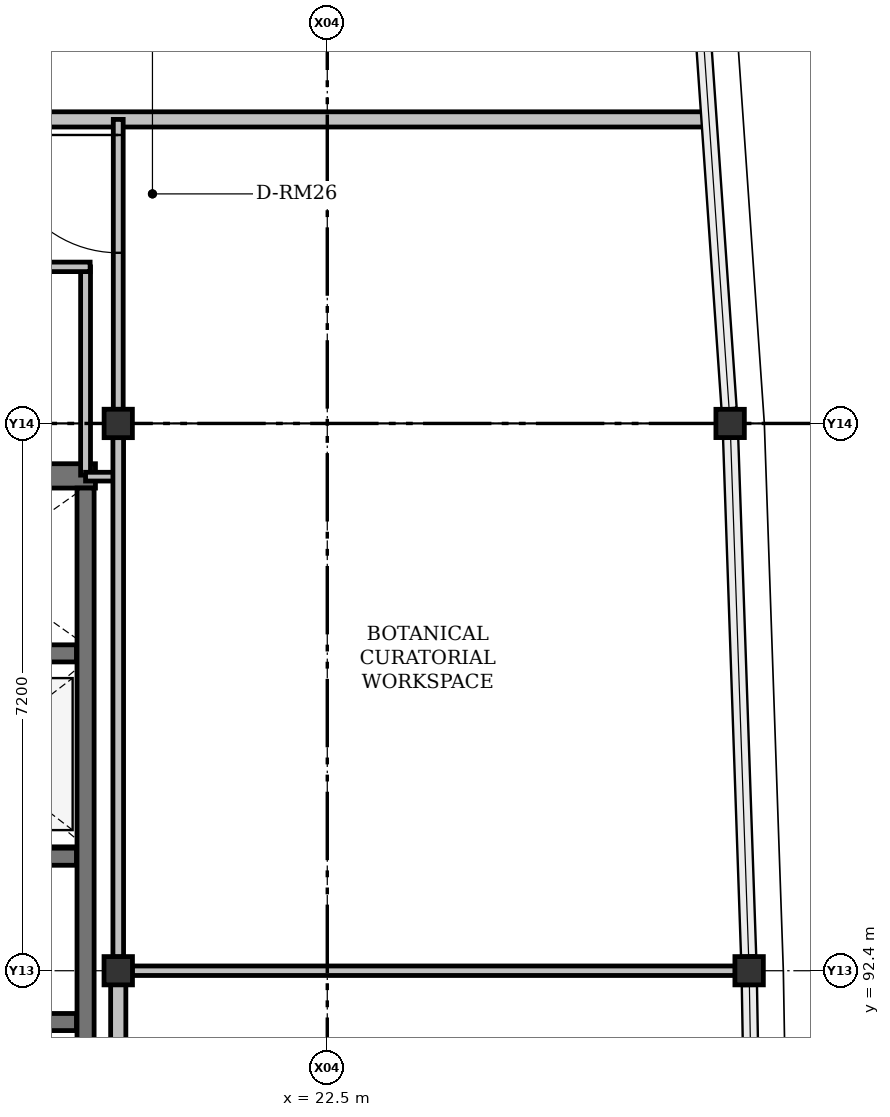
"""IFC4 building model, lengths in metres.
Left out: names, types, materials, properties, quantities, classifications, styles, units other than length and angle.
Written with IfcOpenShell. Run it as: python <this file> out.ifc"""

import sys

from ifc_helpers import new_model, si_unit, direction, frame, frame_2d, origin, origin_2d, place, context, subcontext, project, spatial, rectangle, i_section, extrude, element, fill, save


model = new_model("IFC4")
c1 = context("Model", 3, precision=1e-05, world=origin(), true_north=direction((0.0, 1.0)))
c2 = subcontext(c1, "Body", "Model", "MODEL_VIEW")
j1 = project(units=[si_unit("LENGTHUNIT", "METRE"), si_unit("PLANEANGLEUNIT", "RADIAN")], contexts=[c1])
p1 = place(None, origin())
s1 = spatial("IfcSite", under=j1, at=p1, CompositionType="ELEMENT")
p2 = place(p1, origin())
s2 = spatial("IfcBuilding", under=s1, at=p2, CompositionType="ELEMENT")
p3 = place(p2, frame((0.0, 0.0, 26.7)))
s3 = spatial("IfcBuildingStorey", under=s2, at=p3, CompositionType="ELEMENT", Elevation=26.7)
for number, where, z_axis, x_axis in (
    (1, (19.75, 92.4, 0.0), (0.0, 0.0, 1.0), (1.0, 0.0, 0.0)),
    (2, (28.05, 92.4, 0.0), (0.0, 0.0, 1.0), (1.0, 0.0, 0.0)),
    (3, (19.75, 99.6, 0.0), (0.0, 0.0, 1.0), (0.0, 1.0, 0.0)),
    (4, (27.8, 99.6, 0.0), (0.0, 0.0, 1.0), (1.0, 0.0, 0.0)),
):
    element("IfcColumn", number, at=place(p3, frame(where, z_axis=z_axis, x_axis=x_axis)), inside=s3, PredefinedType="COLUMN", context=c2, shape_type="SweptSolid", body=[
        extrude(i_section(OverallWidth=0.374, OverallDepth=0.372, WebThickness=0.016, FlangeThickness=0.026, FilletRadius=0.015, at=origin_2d()), origin(), (0.0, 0.0, 1.0), 4.2),
    ])
p4 = place(p3, frame((16.15, 98.91, 0.0), z_axis=(0.0, 0.0, 1.0), x_axis=(1.0, 0.0, 0.0)))
e5 = element("IfcWall", 5, at=p4, inside=s3, PredefinedType="SHEAR", context=c2, shape_type="SweptSolid", body=[
    extrude(rectangle(XDim=3.3, YDim=0.32, at=frame_2d((1.65, 0.0))), origin(), (0.0, 0.0, 1.0), 4.2),
])
p5 = place(p3, frame((19.32, 84.8, 0.0), z_axis=(0.0, 0.0, 1.0), x_axis=(0.0, 1.0, 0.0)))
e6 = element("IfcWall", 6, at=p5, inside=s3, PredefinedType="SHEAR", context=c2, shape_type="SweptSolid", body=[
    extrude(rectangle(XDim=13.95, YDim=0.225, at=frame_2d((6.975, 0.0))), origin(), (0.0, 0.0, 1.0), 4.2),
])
for number, where, z_axis, x_axis in (
    (7, (16.4, 91.725, 0.0), (0.0, 0.0, 1.0), (1.0, 0.0, 0.0)),
    (8, (16.4, 93.9, 0.0), (0.0, 0.0, 1.0), (1.0, 0.0, 0.0)),
    (9, (16.4, 96.575, 0.0), (0.0, 0.0, 1.0), (1.0, 0.0, 0.0)),
):
    element("IfcWall", number, at=place(p3, frame(where, z_axis=z_axis, x_axis=x_axis)), inside=s3, PredefinedType="SHEAR", context=c2, shape_type="SweptSolid", body=[
        extrude(rectangle(XDim=2.8, YDim=0.225, at=frame_2d((1.4, 0.0))), origin(), (0.0, 0.0, 1.0), 4.2),
    ])
p6 = place(p3, frame((19.32, 98.92, 0.0), z_axis=(0.0, 0.0, 1.0), x_axis=(0.0, 1.0, 0.0)))
e10 = element("IfcWall", 10, at=p6, inside=s3, PredefinedType="PARTITIONING", context=c2, shape_type="SweptSolid", body=[
    extrude(rectangle(XDim=2.74, YDim=0.13, at=frame_2d((1.37, 0.0))), origin(), (0.0, 0.0, 1.0), 3.277),
])
p7 = place(p3, frame((19.38, 101.66, 0.0), z_axis=(0.0, 0.0, 1.0), x_axis=(-1.0, 0.0, 0.0)))
e11 = element("IfcWall", 11, at=p7, inside=s3, PredefinedType="PARTITIONING", context=c2, shape_type="SweptSolid", body=[
    extrude(rectangle(XDim=3.16, YDim=0.125, at=frame_2d((1.58, 0.0))), origin(), (0.0, 0.0, 1.0), 3.95),
])
p8 = place(p3, frame((19.75, 98.9, 0.0), z_axis=(0.0, 0.0, 1.0), x_axis=(-1.0, 0.0, 0.0)))
e12 = element("IfcWall", 12, at=p8, inside=s3, PredefinedType="PARTITIONING", context=c2, shape_type="SweptSolid", body=[
    extrude(rectangle(XDim=0.43, YDim=0.115, at=frame_2d((0.215, 0.0))), origin(), (0.0, 0.0, 1.0), 3.507),
])
p9 = place(p3, frame((0.65, 103.6, 0.0), z_axis=(0.0, 0.0, 1.0), x_axis=(1.0, 0.0, 0.0)))
e13 = element("IfcWall", 13, at=p9, inside=s3, PredefinedType="SOLIDWALL", context=c2, shape_type="SweptSolid", body=[
    extrude(rectangle(XDim=26.89, YDim=0.2, at=frame_2d((13.445, 0.0))), origin(), (0.0, 0.0, 1.0), 3.507),
])
p10 = place(p9, frame((9.2, 0.0, 0.0)))
e14 = element("IfcOpeningElement", 14, at=p10, cuts=e13, PredefinedType="OPENING", context=c2, shape_type="SweptSolid", body=[
    extrude(rectangle(XDim=1.5, YDim=2.3, at=frame_2d((0.75, 1.15))), frame((0.0, 0.1, 0.0), z_axis=(0.0, -1.0, 0.0), x_axis=(1.0, 0.0, 0.0)), (0.0, 0.0, 1.0), 0.2),
])
p11 = place(p3, frame((19.75, 85.382, 0.0), z_axis=(0.0, 0.0, 1.0), x_axis=(0.0, 1.0, 0.0)))
e15 = element("IfcWall", 15, at=p11, inside=s3, PredefinedType="SOLIDWALL", context=c2, shape_type="SweptSolid", body=[
    extrude(rectangle(XDim=6.837, YDim=0.2, at=frame_2d((3.418, 0.0))), origin(), (0.0, 0.0, 1.0), 3.507),
])
p12 = place(p3, frame((19.75, 92.581, 0.0), z_axis=(0.0, 0.0, 1.0), x_axis=(0.0, 1.0, 0.0)))
e16 = element("IfcWall", 16, at=p12, inside=s3, PredefinedType="PARTITIONING", context=c2, shape_type="SweptSolid", body=[
    extrude(rectangle(XDim=6.837, YDim=0.14, at=frame_2d((3.418, 0.0))), origin(), (0.0, 0.0, 1.0), 3.507),
])
p13 = place(p3, frame((19.75, 99.782, 0.0), z_axis=(0.0, 0.0, 1.0), x_axis=(0.0, 1.0, 0.0)))
e17 = element("IfcWall", 17, at=p13, inside=s3, PredefinedType="PARTITIONING", context=c2, shape_type="SweptSolid", body=[
    extrude(rectangle(XDim=3.818, YDim=0.13, at=frame_2d((1.909, 0.0))), origin(), (0.0, 0.0, 1.0), 3.507),
])
p14 = place(p13, frame((2.063, 0.0, 0.0)))
e18 = element("IfcOpeningElement", 18, at=p14, cuts=e17, PredefinedType="OPENING", context=c2, shape_type="SweptSolid", body=[
    extrude(rectangle(XDim=1.55, YDim=2.3, at=frame_2d((0.775, 1.15))), frame((0.0, 0.065, 0.0), z_axis=(0.0, -1.0, 0.0), x_axis=(1.0, 0.0, 0.0)), (0.0, 0.0, 1.0), 0.13),
])
p15 = place(p3, frame((27.868, 92.4, 0.0), z_axis=(0.0, 0.0, 1.0), x_axis=(-1.0, 0.0, 0.0)))
e19 = element("IfcWall", 19, at=p15, inside=s3, PredefinedType="PARTITIONING", context=c2, shape_type="SweptSolid", body=[
    extrude(rectangle(XDim=7.936, YDim=0.125, at=frame_2d((3.968, 0.0))), origin(), (0.0, 0.0, 1.0), 3.277),
])
p16 = place(p14, origin())
e20 = element("IfcDoor", 20, at=p16, inside=s3, OperationType="SINGLE_SWING_RIGHT", PredefinedType="DOOR", context=c2, shape_type="SweptSolid", body=[
    extrude(rectangle(XDim=1.55, YDim=2.3, at=frame_2d((0.775, 1.15))), frame((0.0, 0.025, 0.0), z_axis=(0.0, -1.0, 0.0), x_axis=(1.0, 0.0, 0.0)), (0.0, 0.0, 1.0), 0.05),
])
fill(e18, e20)
save(model, sys.argv[1])
